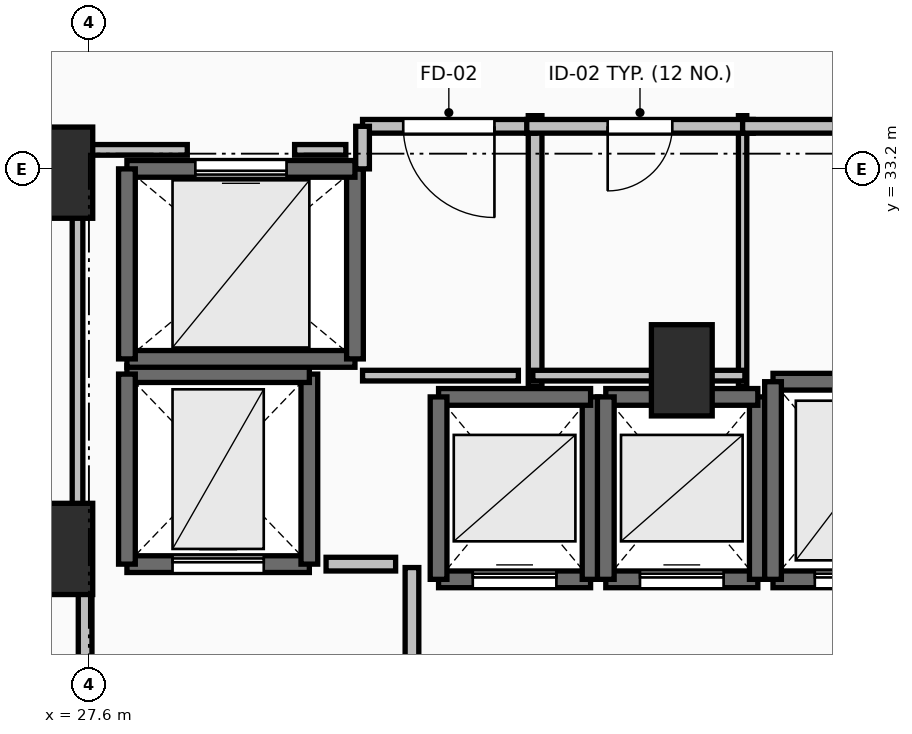
"""IFC4 building model, lengths in metres.
Left out: names, types, materials, properties, quantities, classifications, styles, units other than length and angle.
Written with IfcOpenShell. Run it as: python <this file> out.ifc"""

import sys

from ifc_helpers import new_model, si_unit, direction, frame, frame_2d, origin, origin_2d, place, context, subcontext, project, spatial, rectangle, extrude, element, fill, save


model = new_model("IFC4")
c1 = context("Model", 3, precision=1e-05, world=origin(), true_north=direction((0.0, 1.0)))
c2 = subcontext(c1, "Body", "Model", "MODEL_VIEW")
j1 = project(units=[si_unit("LENGTHUNIT", "METRE"), si_unit("PLANEANGLEUNIT", "RADIAN")], contexts=[c1])
p1 = place(None, origin())
s1 = spatial("IfcSite", under=j1, at=p1, CompositionType="ELEMENT")
p2 = place(p1, origin())
s2 = spatial("IfcBuilding", under=s1, at=p2, CompositionType="ELEMENT")
p3 = place(p2, frame((0.0, 0.0, 85.8)))
s3 = spatial("IfcBuildingStorey", under=s2, at=p3, CompositionType="ELEMENT", Elevation=85.8)
for number, where, z_axis, x_axis in (
    (1, (27.25, 28.2, 0.0), (0.0, 0.0, 1.0), (1.0, 0.0, 0.0)),
    (2, (27.25, 33.15, 0.0), (0.0, 0.0, 1.0), (1.0, 0.0, 0.0)),
    (3, (35.4, 30.55, 0.0), (0.0, 0.0, 1.0), (1.0, 0.0, 0.0)),
):
    element("IfcColumn", number, at=place(p3, frame(where, z_axis=z_axis, x_axis=x_axis)), inside=s3, PredefinedType="PILASTER", context=c2, shape_type="SweptSolid", body=[
        extrude(rectangle(XDim=0.8, YDim=1.2, at=origin_2d()), origin(), (0.0, 0.0, 1.0), 3.5),
    ])
p4 = place(p3, frame((32.2, 27.8, 0.0), z_axis=(0.0, 0.0, 1.0), x_axis=(1.0, 0.0, 0.0)))
e4 = element("IfcWall", 4, at=p4, inside=s3, PredefinedType="SOLIDWALL", context=c2, shape_type="SweptSolid", body=[
    extrude(rectangle(XDim=2.0, YDim=0.22, at=frame_2d((1.0, 0.0))), origin(), (0.0, 0.0, 1.0), 3.24),
])
p5 = place(p4, frame((0.45, 0.0, 0.0)))
e5 = element("IfcOpeningElement", 5, at=p5, cuts=e4, PredefinedType="OPENING", context=c2, shape_type="SweptSolid", body=[
    extrude(rectangle(XDim=1.1, YDim=2.2, at=frame_2d((0.55, 1.1))), frame((0.0, 0.125, 0.0), z_axis=(0.0, -1.0, 0.0), x_axis=(1.0, 0.0, 0.0)), (0.0, 0.0, 1.0), 0.25),
])
p6 = place(p3, frame((34.2, 27.8, 0.0), z_axis=(0.0, 0.0, 1.0), x_axis=(0.0, 1.0, 0.0)))
e6 = element("IfcWall", 6, at=p6, inside=s3, PredefinedType="SOLIDWALL", context=c2, shape_type="SweptSolid", body=[
    extrude(rectangle(XDim=2.4, YDim=0.22, at=frame_2d((1.2, 0.0))), origin(), (0.0, 0.0, 1.0), 3.24),
])
p7 = place(p3, frame((34.2, 30.2, 0.0), z_axis=(0.0, 0.0, 1.0), x_axis=(-1.0, 0.0, 0.0)))
e7 = element("IfcWall", 7, at=p7, inside=s3, PredefinedType="SOLIDWALL", context=c2, shape_type="SweptSolid", body=[
    extrude(rectangle(XDim=2.0, YDim=0.22, at=frame_2d((1.0, 0.0))), origin(), (0.0, 0.0, 1.0), 3.24),
])
p8 = place(p3, frame((32.2, 30.2, 0.0), z_axis=(0.0, 0.0, 1.0), x_axis=(0.0, -1.0, 0.0)))
e8 = element("IfcWall", 8, at=p8, inside=s3, PredefinedType="SOLIDWALL", context=c2, shape_type="SweptSolid", body=[
    extrude(rectangle(XDim=2.4, YDim=0.22, at=frame_2d((1.2, 0.0))), origin(), (0.0, 0.0, 1.0), 3.24),
])
p9 = place(p3, frame((34.4, 27.8, 0.0), z_axis=(0.0, 0.0, 1.0), x_axis=(1.0, 0.0, 0.0)))
e9 = element("IfcWall", 9, at=p9, inside=s3, PredefinedType="SOLIDWALL", context=c2, shape_type="SweptSolid", body=[
    extrude(rectangle(XDim=2.0, YDim=0.22, at=frame_2d((1.0, 0.0))), origin(), (0.0, 0.0, 1.0), 3.24),
])
p10 = place(p9, frame((0.45, 0.0, 0.0)))
e10 = element("IfcOpeningElement", 10, at=p10, cuts=e9, PredefinedType="OPENING", context=c2, shape_type="SweptSolid", body=[
    extrude(rectangle(XDim=1.1, YDim=2.2, at=frame_2d((0.55, 1.1))), frame((0.0, 0.125, 0.0), z_axis=(0.0, -1.0, 0.0), x_axis=(1.0, 0.0, 0.0)), (0.0, 0.0, 1.0), 0.25),
])
p11 = place(p3, frame((36.4, 27.8, 0.0), z_axis=(0.0, 0.0, 1.0), x_axis=(0.0, 1.0, 0.0)))
e11 = element("IfcWall", 11, at=p11, inside=s3, PredefinedType="SOLIDWALL", context=c2, shape_type="SweptSolid", body=[
    extrude(rectangle(XDim=2.4, YDim=0.22, at=frame_2d((1.2, 0.0))), origin(), (0.0, 0.0, 1.0), 3.24),
])
p12 = place(p3, frame((36.4, 30.2, 0.0), z_axis=(0.0, 0.0, 1.0), x_axis=(-1.0, 0.0, 0.0)))
e12 = element("IfcWall", 12, at=p12, inside=s3, PredefinedType="SOLIDWALL", context=c2, shape_type="SweptSolid", body=[
    extrude(rectangle(XDim=2.0, YDim=0.22, at=frame_2d((1.0, 0.0))), origin(), (0.0, 0.0, 1.0), 3.24),
])
p13 = place(p3, frame((34.4, 30.2, 0.0), z_axis=(0.0, 0.0, 1.0), x_axis=(0.0, -1.0, 0.0)))
e13 = element("IfcWall", 13, at=p13, inside=s3, PredefinedType="SOLIDWALL", context=c2, shape_type="SweptSolid", body=[
    extrude(rectangle(XDim=2.4, YDim=0.22, at=frame_2d((1.2, 0.0))), origin(), (0.0, 0.0, 1.0), 3.24),
])
p14 = place(p3, frame((36.6, 27.8, 0.0), z_axis=(0.0, 0.0, 1.0), x_axis=(1.0, 0.0, 0.0)))
e14 = element("IfcWall", 14, at=p14, inside=s3, PredefinedType="SOLIDWALL", context=c2, shape_type="SweptSolid", body=[
    extrude(rectangle(XDim=2.2, YDim=0.22, at=frame_2d((1.1, 0.0))), origin(), (0.0, 0.0, 1.0), 3.24),
])
p15 = place(p14, frame((0.55, 0.0, 0.0)))
e15 = element("IfcOpeningElement", 15, at=p15, cuts=e14, PredefinedType="OPENING", context=c2, shape_type="SweptSolid", body=[
    extrude(rectangle(XDim=1.1, YDim=2.2, at=frame_2d((0.55, 1.1))), frame((0.0, 0.125, 0.0), z_axis=(0.0, -1.0, 0.0), x_axis=(1.0, 0.0, 0.0)), (0.0, 0.0, 1.0), 0.25),
])
p16 = place(p3, frame((38.8, 30.4, 0.0), z_axis=(0.0, 0.0, 1.0), x_axis=(-1.0, 0.0, 0.0)))
e16 = element("IfcWall", 16, at=p16, inside=s3, PredefinedType="SOLIDWALL", context=c2, shape_type="SweptSolid", body=[
    extrude(rectangle(XDim=2.2, YDim=0.22, at=frame_2d((1.1, 0.0))), origin(), (0.0, 0.0, 1.0), 3.24),
])
p17 = place(p3, frame((36.6, 30.4, 0.0), z_axis=(0.0, 0.0, 1.0), x_axis=(0.0, -1.0, 0.0)))
e17 = element("IfcWall", 17, at=p17, inside=s3, PredefinedType="SOLIDWALL", context=c2, shape_type="SweptSolid", body=[
    extrude(rectangle(XDim=2.6, YDim=0.22, at=frame_2d((1.3, 0.0))), origin(), (0.0, 0.0, 1.0), 3.24),
])
p18 = place(p3, frame((28.1, 28.0, 0.0), z_axis=(0.0, 0.0, 1.0), x_axis=(1.0, 0.0, 0.0)))
e18 = element("IfcWall", 18, at=p18, inside=s3, PredefinedType="SHEAR", context=c2, shape_type="SweptSolid", body=[
    extrude(rectangle(XDim=2.4, YDim=0.22, at=frame_2d((1.2, 0.0))), origin(), (0.0, 0.0, 1.0), 3.24),
])
p19 = place(p18, frame((0.6, 0.0, 0.0)))
e19 = element("IfcOpeningElement", 19, at=p19, cuts=e18, PredefinedType="OPENING", context=c2, shape_type="SweptSolid", body=[
    extrude(rectangle(XDim=1.2, YDim=2.2, at=frame_2d((0.6, 1.1))), frame((0.0, 0.125, 0.0), z_axis=(0.0, -1.0, 0.0), x_axis=(1.0, 0.0, 0.0)), (0.0, 0.0, 1.0), 0.25),
])
p20 = place(p3, frame((30.5, 28.0, 0.0), z_axis=(0.0, 0.0, 1.0), x_axis=(0.0, 1.0, 0.0)))
e20 = element("IfcWall", 20, at=p20, inside=s3, PredefinedType="SHEAR", context=c2, shape_type="SweptSolid", body=[
    extrude(rectangle(XDim=2.5, YDim=0.22, at=frame_2d((1.25, 0.0))), origin(), (0.0, 0.0, 1.0), 3.24),
])
p21 = place(p3, frame((30.5, 30.5, 0.0), z_axis=(0.0, 0.0, 1.0), x_axis=(-1.0, 0.0, 0.0)))
e21 = element("IfcWall", 21, at=p21, inside=s3, PredefinedType="SHEAR", context=c2, shape_type="SweptSolid", body=[
    extrude(rectangle(XDim=2.4, YDim=0.22, at=frame_2d((1.2, 0.0))), origin(), (0.0, 0.0, 1.0), 3.24),
])
p22 = place(p3, frame((28.1, 30.5, 0.0), z_axis=(0.0, 0.0, 1.0), x_axis=(0.0, -1.0, 0.0)))
e22 = element("IfcWall", 22, at=p22, inside=s3, PredefinedType="SHEAR", context=c2, shape_type="SweptSolid", body=[
    extrude(rectangle(XDim=2.5, YDim=0.22, at=frame_2d((1.25, 0.0))), origin(), (0.0, 0.0, 1.0), 3.24),
])
p23 = place(p3, frame((28.1, 30.7, 0.0), z_axis=(0.0, 0.0, 1.0), x_axis=(1.0, 0.0, 0.0)))
e23 = element("IfcWall", 23, at=p23, inside=s3, PredefinedType="SOLIDWALL", context=c2, shape_type="SweptSolid", body=[
    extrude(rectangle(XDim=3.0, YDim=0.22, at=frame_2d((1.5, 0.0))), origin(), (0.0, 0.0, 1.0), 3.24),
])
p24 = place(p3, frame((31.1, 30.7, 0.0), z_axis=(0.0, 0.0, 1.0), x_axis=(0.0, 1.0, 0.0)))
e24 = element("IfcWall", 24, at=p24, inside=s3, PredefinedType="SOLIDWALL", context=c2, shape_type="SweptSolid", body=[
    extrude(rectangle(XDim=2.5, YDim=0.22, at=frame_2d((1.25, 0.0))), origin(), (0.0, 0.0, 1.0), 3.24),
])
p25 = place(p3, frame((31.1, 33.2, 0.0), z_axis=(0.0, 0.0, 1.0), x_axis=(-1.0, 0.0, 0.0)))
e25 = element("IfcWall", 25, at=p25, inside=s3, PredefinedType="SOLIDWALL", context=c2, shape_type="SweptSolid", body=[
    extrude(rectangle(XDim=3.0, YDim=0.22, at=frame_2d((1.5, 0.0))), origin(), (0.0, 0.0, 1.0), 3.24),
])
p26 = place(p25, frame((0.9, 0.0, 0.0)))
e26 = element("IfcOpeningElement", 26, at=p26, cuts=e25, PredefinedType="OPENING", context=c2, shape_type="SweptSolid", body=[
    extrude(rectangle(XDim=1.2, YDim=2.2, at=frame_2d((0.6, 1.1))), frame((0.0, 0.125, 0.0), z_axis=(0.0, -1.0, 0.0), x_axis=(1.0, 0.0, 0.0)), (0.0, 0.0, 1.0), 0.25),
])
p27 = place(p3, frame((28.1, 33.2, 0.0), z_axis=(0.0, 0.0, 1.0), x_axis=(0.0, -1.0, 0.0)))
e27 = element("IfcWall", 27, at=p27, inside=s3, PredefinedType="SOLIDWALL", context=c2, shape_type="SweptSolid", body=[
    extrude(rectangle(XDim=2.5, YDim=0.22, at=frame_2d((1.25, 0.0))), origin(), (0.0, 0.0, 1.0), 3.24),
])
p28 = place(p3, frame((31.85, 24.045, 0.0), z_axis=(0.0, 0.0, 1.0), x_axis=(0.0, 1.0, 0.0)))
e28 = element("IfcWall", 28, at=p28, inside=s3, PredefinedType="PARTITIONING", context=c2, shape_type="SweptSolid", body=[
    extrude(rectangle(XDim=3.91, YDim=0.18, at=frame_2d((1.955, 0.0))), origin(), (0.0, 0.0, 1.0), 3.24),
])
p29 = place(p28, frame((1.355, 0.0, 0.0)))
e29 = element("IfcOpeningElement", 29, at=p29, cuts=e28, PredefinedType="OPENING", context=c2, shape_type="SweptSolid", body=[
    extrude(rectangle(XDim=1.2, YDim=2.15, at=frame_2d((0.6, 1.075))), frame((0.0, 0.105, 0.0), z_axis=(0.0, -1.0, 0.0), x_axis=(1.0, 0.0, 0.0)), (0.0, 0.0, 1.0), 0.21),
])
p30 = place(p3, frame((27.55, 28.0, 0.0), z_axis=(0.0, 0.0, 1.0), x_axis=(0.0, -1.0, 0.0)))
e30 = element("IfcWall", 30, at=p30, inside=s3, PredefinedType="PARTITIONING", context=c2, shape_type="SweptSolid", body=[
    extrude(rectangle(XDim=4.05, YDim=0.18, at=frame_2d((2.025, 0.0))), origin(), (0.0, 0.0, 1.0), 3.24),
])
p31 = place(p30, frame((1.425, 0.0, 0.0)))
e31 = element("IfcOpeningElement", 31, at=p31, cuts=e30, PredefinedType="OPENING", context=c2, shape_type="SweptSolid", body=[
    extrude(rectangle(XDim=1.2, YDim=2.15, at=frame_2d((0.6, 1.075))), frame((0.0, 0.105, 0.0), z_axis=(0.0, -1.0, 0.0), x_axis=(1.0, 0.0, 0.0)), (0.0, 0.0, 1.0), 0.21),
])
p32 = place(p3, frame((33.47, 30.34, 0.0), z_axis=(0.0, 0.0, 1.0), x_axis=(0.0, 1.0, 0.0)))
e32 = element("IfcWall", 32, at=p32, inside=s3, PredefinedType="PARTITIONING", context=c2, shape_type="SweptSolid", body=[
    extrude(rectangle(XDim=3.56, YDim=0.18, at=frame_2d((1.78, 0.0))), origin(), (0.0, 0.0, 1.0), 3.24),
])
p33 = place(p3, frame((33.47, 33.76, 0.0), z_axis=(0.0, 0.0, 1.0), x_axis=(-1.0, 0.0, 0.0)))
e33 = element("IfcWall", 33, at=p33, inside=s3, PredefinedType="PARTITIONING", context=c2, shape_type="SweptSolid", body=[
    extrude(rectangle(XDim=2.27, YDim=0.18, at=frame_2d((1.135, 0.0))), origin(), (0.0, 0.0, 1.0), 3.24),
])
p34 = place(p33, frame((0.535, 0.0, 0.0)))
e34 = element("IfcOpeningElement", 34, at=p34, cuts=e33, PredefinedType="OPENING", context=c2, shape_type="SweptSolid", body=[
    extrude(rectangle(XDim=1.2, YDim=2.15, at=frame_2d((0.6, 1.075))), frame((0.0, 0.105, 0.0), z_axis=(0.0, -1.0, 0.0), x_axis=(1.0, 0.0, 0.0)), (0.0, 0.0, 1.0), 0.21),
])
p35 = place(p3, frame((31.2, 33.76, 0.0), z_axis=(0.0, 0.0, 1.0), x_axis=(0.0, -1.0, 0.0)))
e35 = element("IfcWall", 35, at=p35, inside=s3, PredefinedType="PARTITIONING", context=c2, shape_type="SweptSolid", body=[
    extrude(rectangle(XDim=0.56, YDim=0.18, at=frame_2d((0.28, 0.0))), origin(), (0.0, 0.0, 1.0), 3.24),
])
p36 = place(p3, frame((36.2, 30.34, 0.0), z_axis=(0.0, 0.0, 1.0), x_axis=(0.0, 1.0, 0.0)))
e36 = element("IfcWall", 36, at=p36, inside=s3, PredefinedType="PARTITIONING", context=c2, shape_type="SweptSolid", body=[
    extrude(rectangle(XDim=3.56, YDim=0.11, at=frame_2d((1.78, 0.0))), origin(), (0.0, 0.0, 1.0), 2.432),
])
p37 = place(p3, frame((36.34, 33.76, 0.0), z_axis=(0.0, 0.0, 1.0), x_axis=(-1.0, 0.0, 0.0)))
e37 = element("IfcWall", 37, at=p37, inside=s3, PredefinedType="PARTITIONING", context=c2, shape_type="SweptSolid", body=[
    extrude(rectangle(XDim=2.98, YDim=0.18, at=frame_2d((1.49, 0.0))), origin(), (0.0, 0.0, 1.0), 3.24),
])
p38 = place(p37, frame((1.065, 0.0, 0.0)))
e38 = element("IfcOpeningElement", 38, at=p38, cuts=e37, PredefinedType="OPENING", context=c2, shape_type="SweptSolid", body=[
    extrude(rectangle(XDim=0.85, YDim=2.1, at=frame_2d((0.425, 1.05))), frame((0.0, 0.105, 0.0), z_axis=(0.0, -1.0, 0.0), x_axis=(1.0, 0.0, 0.0)), (0.0, 0.0, 1.0), 0.21),
])
p39 = place(p3, frame((41.04, 33.76, 0.0), z_axis=(0.0, 0.0, 1.0), x_axis=(-1.0, 0.0, 0.0)))
e39 = element("IfcWall", 39, at=p39, inside=s3, PredefinedType="PARTITIONING", context=c2, shape_type="SweptSolid", body=[
    extrude(rectangle(XDim=4.84, YDim=0.18, at=frame_2d((2.42, 0.0))), origin(), (0.0, 0.0, 1.0), 3.24),
])
p40 = place(p39, frame((1.995, 0.0, 0.0)))
e40 = element("IfcOpeningElement", 40, at=p40, cuts=e39, PredefinedType="OPENING", context=c2, shape_type="SweptSolid", body=[
    extrude(rectangle(XDim=0.85, YDim=2.1, at=frame_2d((0.425, 1.05))), frame((0.0, 0.105, 0.0), z_axis=(0.0, -1.0, 0.0), x_axis=(1.0, 0.0, 0.0)), (0.0, 0.0, 1.0), 0.21),
])
p41 = place(p3, frame((31.635, 28.0, 0.0), z_axis=(0.0, 0.0, 1.0), x_axis=(-1.0, 0.0, 0.0)))
e41 = element("IfcWall", 41, at=p41, inside=s3, PredefinedType="PARTITIONING", context=c2, shape_type="SweptSolid", body=[
    extrude(rectangle(XDim=0.915, YDim=0.18, at=frame_2d((0.458, 0.0))), origin(), (0.0, 0.0, 1.0), 3.24),
])
p42 = place(p3, frame((31.2, 30.48, 0.0), z_axis=(0.0, 0.0, 1.0), x_axis=(1.0, 0.0, 0.0)))
e42 = element("IfcWall", 42, at=p42, inside=s3, PredefinedType="PARTITIONING", context=c2, shape_type="SweptSolid", body=[
    extrude(rectangle(XDim=2.05, YDim=0.14, at=frame_2d((1.025, 0.0))), origin(), (0.0, 0.0, 1.0), 3.24),
])
p43 = place(p3, frame((33.44, 30.48, 0.0), z_axis=(0.0, 0.0, 1.0), x_axis=(1.0, 0.0, 0.0)))
e43 = element("IfcWall", 43, at=p43, inside=s3, PredefinedType="PARTITIONING", context=c2, shape_type="SweptSolid", body=[
    extrude(rectangle(XDim=2.79, YDim=0.14, at=frame_2d((1.395, 0.0))), origin(), (0.0, 0.0, 1.0), 2.432),
])
p44 = place(p3, frame((27.45, 28.196, 0.0), z_axis=(0.0, 0.0, 1.0), x_axis=(0.0, 1.0, 0.0)))
e44 = element("IfcWall", 44, at=p44, inside=s3, PredefinedType="PARTITIONING", context=c2, shape_type="SweptSolid", body=[
    extrude(rectangle(XDim=5.254, YDim=0.14, at=frame_2d((2.627, 0.0))), origin(), (0.0, 0.0, 1.0), 2.432),
])
p45 = place(p3, frame((27.45, 33.45, 0.0), z_axis=(0.0, 0.0, 1.0), x_axis=(1.0, 0.0, 0.0)))
e45 = element("IfcWall", 45, at=p45, inside=s3, PredefinedType="PARTITIONING", context=c2, shape_type="SweptSolid", body=[
    extrude(rectangle(XDim=1.444, YDim=0.14, at=frame_2d((0.722, 0.0))), origin(), (0.0, 0.0, 1.0), 2.432),
])
p46 = place(p3, frame((30.306, 33.45, 0.0), z_axis=(0.0, 0.0, 1.0), x_axis=(1.0, 0.0, 0.0)))
e46 = element("IfcWall", 46, at=p46, inside=s3, PredefinedType="PARTITIONING", context=c2, shape_type="SweptSolid", body=[
    extrude(rectangle(XDim=0.674, YDim=0.14, at=frame_2d((0.337, 0.0))), origin(), (0.0, 0.0, 1.0), 3.24),
])
p47 = place(p5, origin())
e47 = element("IfcDoor", 47, at=p47, inside=s3, OperationType="SLIDING_TO_LEFT", PredefinedType="DOOR", context=c2, shape_type="SweptSolid", body=[
    extrude(rectangle(XDim=1.1, YDim=2.2, at=frame_2d((0.55, 1.1))), frame((0.0, 0.025, 0.0), z_axis=(0.0, -1.0, 0.0), x_axis=(1.0, 0.0, 0.0)), (0.0, 0.0, 1.0), 0.05),
])
fill(e5, e47)
p48 = place(p10, origin())
e48 = element("IfcDoor", 48, at=p48, inside=s3, OperationType="SLIDING_TO_LEFT", PredefinedType="DOOR", context=c2, shape_type="SweptSolid", body=[
    extrude(rectangle(XDim=1.1, YDim=2.2, at=frame_2d((0.55, 1.1))), frame((0.0, 0.025, 0.0), z_axis=(0.0, -1.0, 0.0), x_axis=(1.0, 0.0, 0.0)), (0.0, 0.0, 1.0), 0.05),
])
fill(e10, e48)
p49 = place(p15, origin())
e49 = element("IfcDoor", 49, at=p49, inside=s3, OperationType="SLIDING_TO_LEFT", PredefinedType="DOOR", context=c2, shape_type="SweptSolid", body=[
    extrude(rectangle(XDim=1.1, YDim=2.2, at=frame_2d((0.55, 1.1))), frame((0.0, 0.025, 0.0), z_axis=(0.0, -1.0, 0.0), x_axis=(1.0, 0.0, 0.0)), (0.0, 0.0, 1.0), 0.05),
])
fill(e15, e49)
p50 = place(p19, origin())
e50 = element("IfcDoor", 50, at=p50, inside=s3, OperationType="SLIDING_TO_LEFT", PredefinedType="DOOR", context=c2, shape_type="SweptSolid", body=[
    extrude(rectangle(XDim=1.2, YDim=2.2, at=frame_2d((0.6, 1.1))), frame((0.0, 0.025, 0.0), z_axis=(0.0, -1.0, 0.0), x_axis=(1.0, 0.0, 0.0)), (0.0, 0.0, 1.0), 0.05),
])
fill(e19, e50)
p51 = place(p26, origin())
e51 = element("IfcDoor", 51, at=p51, inside=s3, OperationType="SLIDING_TO_LEFT", PredefinedType="DOOR", context=c2, shape_type="SweptSolid", body=[
    extrude(rectangle(XDim=1.2, YDim=2.2, at=frame_2d((0.6, 1.1))), frame((0.0, 0.025, 0.0), z_axis=(0.0, -1.0, 0.0), x_axis=(1.0, 0.0, 0.0)), (0.0, 0.0, 1.0), 0.05),
])
fill(e26, e51)
p52 = place(p34, origin())
e52 = element("IfcDoor", 52, at=p52, inside=s3, OperationType="SINGLE_SWING_LEFT", PredefinedType="DOOR", context=c2, shape_type="SweptSolid", body=[
    extrude(rectangle(XDim=1.2, YDim=2.15, at=frame_2d((0.6, 1.075))), frame((0.0, 0.025, 0.0), z_axis=(0.0, -1.0, 0.0), x_axis=(1.0, 0.0, 0.0)), (0.0, 0.0, 1.0), 0.05),
])
fill(e34, e52)
p53 = place(p38, origin())
e53 = element("IfcDoor", 53, at=p53, inside=s3, OperationType="SINGLE_SWING_RIGHT", PredefinedType="DOOR", context=c2, shape_type="SweptSolid", body=[
    extrude(rectangle(XDim=0.85, YDim=2.1, at=frame_2d((0.425, 1.05))), frame((0.0, 0.025, 0.0), z_axis=(0.0, -1.0, 0.0), x_axis=(1.0, 0.0, 0.0)), (0.0, 0.0, 1.0), 0.05),
])
fill(e38, e53)
save(model, sys.argv[1])
